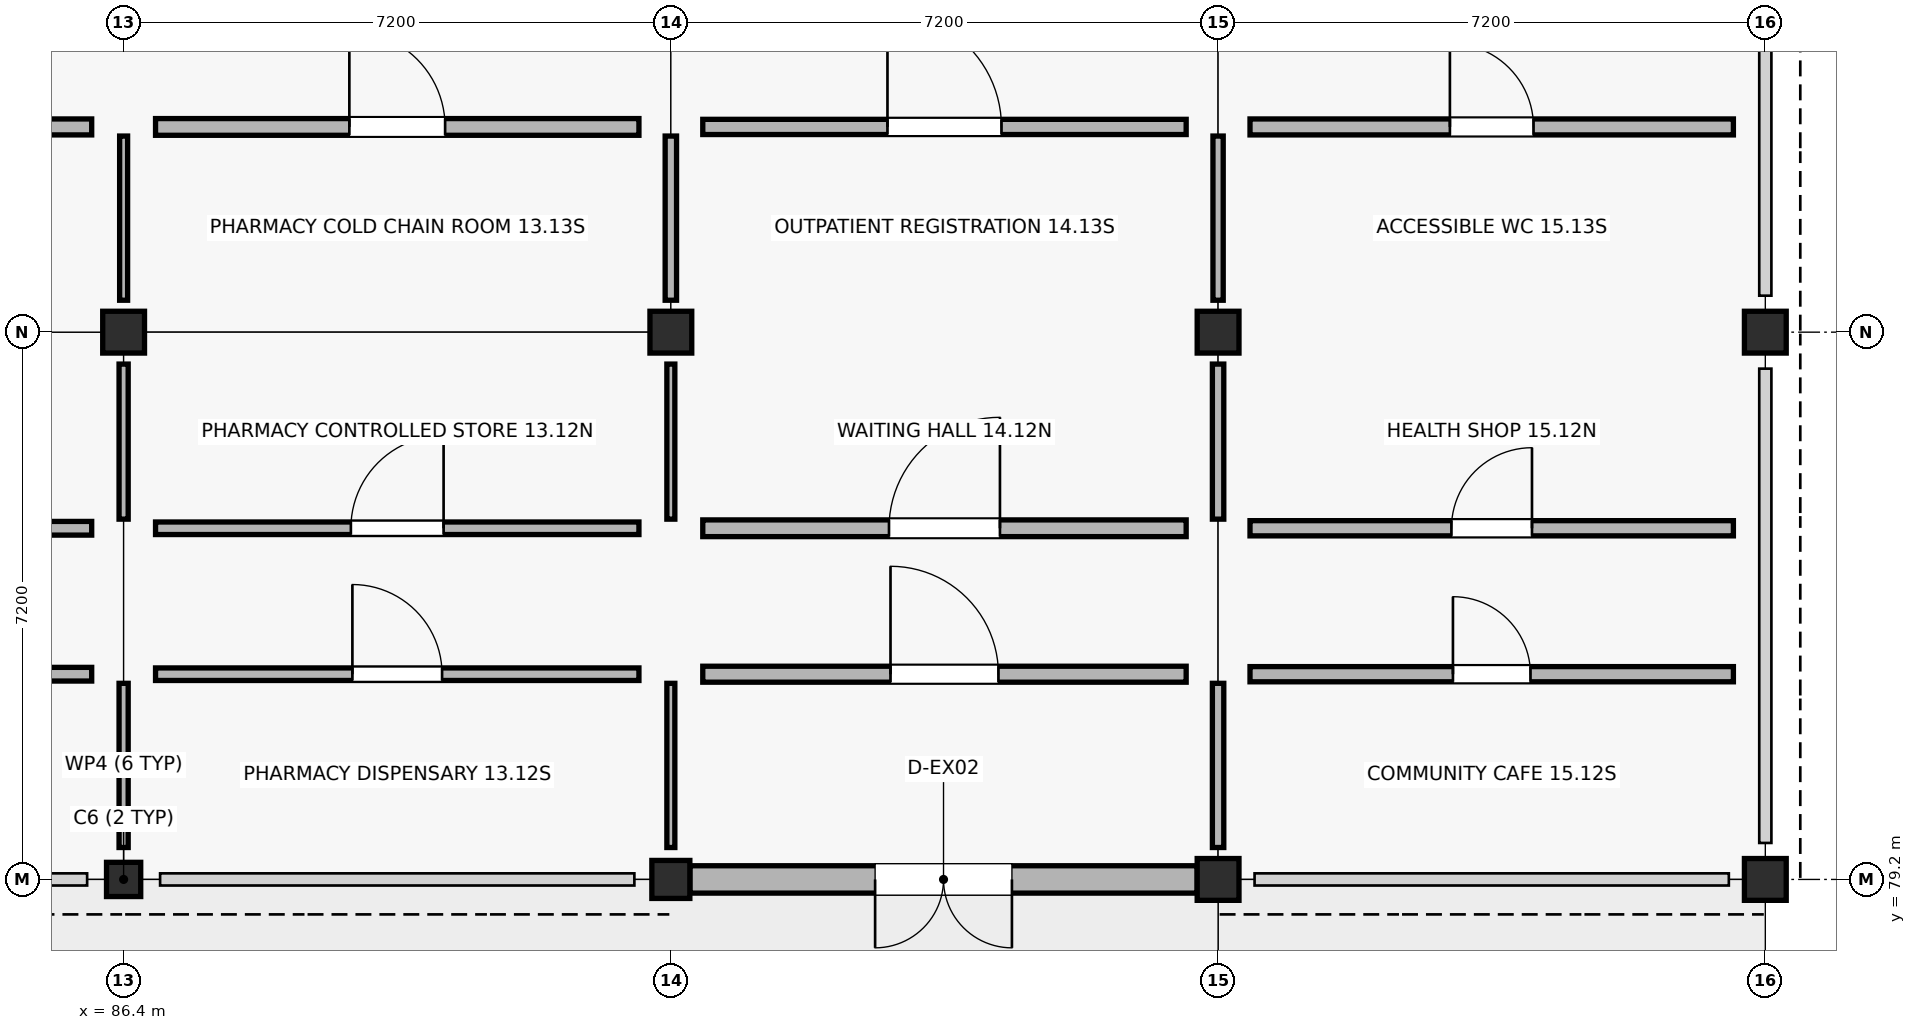
"""IFC4 building model, lengths in metres.
Left out: names, types, materials, properties, quantities, classifications, styles, units other than length and angle.
Written with IfcOpenShell. Run it as: python <this file> out.ifc"""

import sys

from ifc_helpers import new_model, si_unit, direction, frame, frame_2d, origin, origin_2d, place, context, subcontext, project, spatial, rectangle, extrude, element, fill, save


model = new_model("IFC4")
c1 = context("Model", 3, precision=1e-05, world=origin(), true_north=direction((0.0, 1.0)))
c2 = subcontext(c1, "Body", "Model", "MODEL_VIEW")
j1 = project(units=[si_unit("LENGTHUNIT", "METRE"), si_unit("PLANEANGLEUNIT", "RADIAN")], contexts=[c1])
p1 = place(None, origin())
s1 = spatial("IfcSite", under=j1, at=p1, CompositionType="ELEMENT")
p2 = place(p1, origin())
s2 = spatial("IfcBuilding", under=s1, at=p2, CompositionType="ELEMENT")
p3 = place(p2, origin())
s3 = spatial("IfcBuildingStorey", under=s2, at=p3, CompositionType="ELEMENT", Elevation=0.0)
p4 = place(p3, frame((86.4, 79.2, -0.25), z_axis=(0.0, 0.0, 1.0), x_axis=(1.0, 0.0, 0.0)))
e1 = element("IfcColumn", 1, at=p4, inside=s3, PredefinedType="COLUMN", context=c2, shape_type="SweptSolid", body=[
    extrude(rectangle(XDim=0.45, YDim=0.45, at=origin_2d()), origin(), (0.0, 0.0, 1.0), 4.53),
])
p5 = place(p3, frame((86.4, 86.4, -0.25), z_axis=(0.0, 0.0, 1.0), x_axis=(1.0, 0.0, 0.0)))
e2 = element("IfcColumn", 2, at=p5, inside=s3, PredefinedType="COLUMN", context=c2, shape_type="SweptSolid", body=[
    extrude(rectangle(XDim=0.55, YDim=0.55, at=origin_2d()), origin(), (0.0, 0.0, 1.0), 4.75),
])
p6 = place(p3, frame((93.6, 79.2, -0.25), z_axis=(0.0, 0.0, 1.0), x_axis=(1.0, 0.0, 0.0)))
e3 = element("IfcColumn", 3, at=p6, inside=s3, PredefinedType="COLUMN", context=c2, shape_type="SweptSolid", body=[
    extrude(rectangle(XDim=0.5, YDim=0.5, at=origin_2d()), origin(), (0.0, 0.0, 1.0), 4.53),
])
for number, where, z_axis, x_axis in (
    (4, (93.6, 86.4, -0.25), (0.0, 0.0, 1.0), (1.0, 0.0, 0.0)),
    (5, (100.8, 79.2, -0.25), (0.0, 0.0, 1.0), (1.0, 0.0, 0.0)),
    (6, (100.8, 86.4, -0.25), (0.0, 0.0, 1.0), (1.0, 0.0, 0.0)),
    (7, (108.0, 79.2, -0.25), (0.0, 0.0, 1.0), (1.0, 0.0, 0.0)),
    (8, (108.0, 86.4, -0.25), (0.0, 0.0, 1.0), (1.0, 0.0, 0.0)),
):
    element("IfcColumn", number, at=place(p3, frame(where, z_axis=z_axis, x_axis=x_axis)), inside=s3, PredefinedType="COLUMN", context=c2, shape_type="SweptSolid", body=[
        extrude(rectangle(XDim=0.55, YDim=0.55, at=origin_2d()), origin(), (0.0, 0.0, 1.0), 4.75),
    ])
p7 = place(p3, frame((100.525, 79.2, 0.0), z_axis=(0.0, 0.0, 1.0), x_axis=(-1.0, 0.0, 0.0)))
e9 = element("IfcWall", 9, at=p7, inside=s3, PredefinedType="SOLIDWALL", context=c2, shape_type="SweptSolid", body=[
    extrude(rectangle(XDim=6.675, YDim=0.36, at=frame_2d((3.337, 0.0))), origin(), (0.0, 0.0, 1.0), 3.47),
])
p8 = place(p7, frame((2.438, 0.0, 0.0)))
e10 = element("IfcOpeningElement", 10, at=p8, cuts=e9, PredefinedType="OPENING", context=c2, shape_type="SweptSolid", body=[
    extrude(rectangle(XDim=1.8, YDim=2.25, at=frame_2d((0.9, 1.125))), frame((0.0, 0.19, 0.0), z_axis=(0.0, -1.0, 0.0), x_axis=(1.0, 0.0, 0.0)), (0.0, 0.0, 1.0), 0.38),
])
p9 = place(p3, frame((79.62, 81.9, 0.0), z_axis=(0.0, 0.0, 1.0), x_axis=(1.0, 0.0, 0.0)))
e11 = element("IfcWall", 11, at=p9, inside=s3, PredefinedType="PARTITIONING", context=c2, shape_type="SweptSolid", body=[
    extrude(rectangle(XDim=6.36, YDim=0.18, at=frame_2d((3.18, 0.0))), origin(), (0.0, 0.0, 1.0), 3.36),
])
p10 = place(p9, frame((2.71, 0.0, 0.0)))
e12 = element("IfcOpeningElement", 12, at=p10, cuts=e11, PredefinedType="OPENING", context=c2, shape_type="SweptSolid", body=[
    extrude(rectangle(XDim=0.94, YDim=2.04, at=frame_2d((0.47, 1.02))), frame((0.0, 0.1, 0.0), z_axis=(0.0, -1.0, 0.0), x_axis=(1.0, 0.0, 0.0)), (0.0, 0.0, 1.0), 0.2),
])
p11 = place(p3, frame((86.4, 79.62, 0.0), z_axis=(0.0, 0.0, 1.0), x_axis=(0.0, 1.0, 0.0)))
e13 = element("IfcWall", 13, at=p11, inside=s3, PredefinedType="PARTITIONING", context=c2, shape_type="SweptSolid", body=[
    extrude(rectangle(XDim=2.16, YDim=0.12, at=frame_2d((1.08, 0.0))), origin(), (0.0, 0.0, 1.0), 3.36),
])
p12 = place(p3, frame((79.62, 83.82, 0.0), z_axis=(0.0, 0.0, 1.0), x_axis=(1.0, 0.0, 0.0)))
e14 = element("IfcWall", 14, at=p12, inside=s3, PredefinedType="PARTITIONING", context=c2, shape_type="SweptSolid", body=[
    extrude(rectangle(XDim=6.36, YDim=0.18, at=frame_2d((3.18, 0.0))), origin(), (0.0, 0.0, 1.0), 3.36),
])
p13 = place(p12, frame((2.69, 0.0, 0.0)))
e15 = element("IfcOpeningElement", 15, at=p13, cuts=e14, PredefinedType="OPENING", context=c2, shape_type="SweptSolid", body=[
    extrude(rectangle(XDim=0.98, YDim=2.04, at=frame_2d((0.49, 1.02))), frame((0.0, 0.1, 0.0), z_axis=(0.0, -1.0, 0.0), x_axis=(1.0, 0.0, 0.0)), (0.0, 0.0, 1.0), 0.2),
])
p14 = place(p3, frame((86.4, 83.94, 0.0), z_axis=(0.0, 0.0, 1.0), x_axis=(0.0, 1.0, 0.0)))
e16 = element("IfcWall", 16, at=p14, inside=s3, PredefinedType="PARTITIONING", context=c2, shape_type="SweptSolid", body=[
    extrude(rectangle(XDim=2.04, YDim=0.12, at=frame_2d((1.02, 0.0))), origin(), (0.0, 0.0, 1.0), 3.36),
])
p15 = place(p3, frame((79.62, 89.1, 0.0), z_axis=(0.0, 0.0, 1.0), x_axis=(1.0, 0.0, 0.0)))
e17 = element("IfcWall", 17, at=p15, inside=s3, PredefinedType="PLUMBINGWALL", context=c2, shape_type="SweptSolid", body=[
    extrude(rectangle(XDim=6.36, YDim=0.21, at=frame_2d((3.18, 0.0))), origin(), (0.0, 0.0, 1.0), 3.36),
])
p16 = place(p15, frame((2.67, 0.0, 0.0)))
e18 = element("IfcOpeningElement", 18, at=p16, cuts=e17, PredefinedType="OPENING", context=c2, shape_type="SweptSolid", body=[
    extrude(rectangle(XDim=1.02, YDim=2.04, at=frame_2d((0.51, 1.02))), frame((0.0, 0.115, 0.0), z_axis=(0.0, -1.0, 0.0), x_axis=(1.0, 0.0, 0.0)), (0.0, 0.0, 1.0), 0.23),
])
p17 = place(p3, frame((86.4, 86.82, 0.0), z_axis=(0.0, 0.0, 1.0), x_axis=(0.0, 1.0, 0.0)))
e19 = element("IfcWall", 19, at=p17, inside=s3, PredefinedType="PARTITIONING", context=c2, shape_type="SweptSolid", body=[
    extrude(rectangle(XDim=2.16, YDim=0.105, at=frame_2d((1.08, 0.0))), origin(), (0.0, 0.0, 1.0), 3.36),
])
p18 = place(p3, frame((86.82, 81.9, 0.0), z_axis=(0.0, 0.0, 1.0), x_axis=(1.0, 0.0, 0.0)))
e20 = element("IfcWall", 20, at=p18, inside=s3, PredefinedType="PARTITIONING", context=c2, shape_type="SweptSolid", body=[
    extrude(rectangle(XDim=6.36, YDim=0.165, at=frame_2d((3.18, 0.0))), origin(), (0.0, 0.0, 1.0), 3.36),
])
p19 = place(p18, frame((2.59, 0.0, 0.0)))
e21 = element("IfcOpeningElement", 21, at=p19, cuts=e20, PredefinedType="OPENING", context=c2, shape_type="SweptSolid", body=[
    extrude(rectangle(XDim=1.18, YDim=2.04, at=frame_2d((0.59, 1.02))), frame((0.0, 0.093, 0.0), z_axis=(0.0, -1.0, 0.0), x_axis=(1.0, 0.0, 0.0)), (0.0, 0.0, 1.0), 0.185),
])
p20 = place(p3, frame((93.6, 79.62, 0.0), z_axis=(0.0, 0.0, 1.0), x_axis=(0.0, 1.0, 0.0)))
e22 = element("IfcWall", 22, at=p20, inside=s3, PredefinedType="PARTITIONING", context=c2, shape_type="SweptSolid", body=[
    extrude(rectangle(XDim=2.16, YDim=0.105, at=frame_2d((1.08, 0.0))), origin(), (0.0, 0.0, 1.0), 3.36),
])
p21 = place(p3, frame((86.82, 83.82, 0.0), z_axis=(0.0, 0.0, 1.0), x_axis=(1.0, 0.0, 0.0)))
e23 = element("IfcWall", 23, at=p21, inside=s3, PredefinedType="PARTITIONING", context=c2, shape_type="SweptSolid", body=[
    extrude(rectangle(XDim=6.36, YDim=0.165, at=frame_2d((3.18, 0.0))), origin(), (0.0, 0.0, 1.0), 3.36),
])
p22 = place(p21, frame((2.57, 0.0, 0.0)))
e24 = element("IfcOpeningElement", 24, at=p22, cuts=e23, PredefinedType="OPENING", context=c2, shape_type="SweptSolid", body=[
    extrude(rectangle(XDim=1.22, YDim=2.04, at=frame_2d((0.61, 1.02))), frame((0.0, 0.093, 0.0), z_axis=(0.0, -1.0, 0.0), x_axis=(1.0, 0.0, 0.0)), (0.0, 0.0, 1.0), 0.185),
])
p23 = place(p3, frame((93.6, 83.94, 0.0), z_axis=(0.0, 0.0, 1.0), x_axis=(0.0, 1.0, 0.0)))
e25 = element("IfcWall", 25, at=p23, inside=s3, PredefinedType="PARTITIONING", context=c2, shape_type="SweptSolid", body=[
    extrude(rectangle(XDim=2.04, YDim=0.105, at=frame_2d((1.02, 0.0))), origin(), (0.0, 0.0, 1.0), 3.36),
])
p24 = place(p3, frame((86.82, 89.1, 0.0), z_axis=(0.0, 0.0, 1.0), x_axis=(1.0, 0.0, 0.0)))
e26 = element("IfcWall", 26, at=p24, inside=s3, PredefinedType="SOLIDWALL", context=c2, shape_type="SweptSolid", body=[
    extrude(rectangle(XDim=6.36, YDim=0.22, at=frame_2d((3.18, 0.0))), origin(), (0.0, 0.0, 1.0), 3.36),
])
p25 = place(p24, frame((2.55, 0.0, 0.0)))
e27 = element("IfcOpeningElement", 27, at=p25, cuts=e26, PredefinedType="OPENING", context=c2, shape_type="SweptSolid", body=[
    extrude(rectangle(XDim=1.26, YDim=2.04, at=frame_2d((0.63, 1.02))), frame((0.0, 0.12, 0.0), z_axis=(0.0, -1.0, 0.0), x_axis=(1.0, 0.0, 0.0)), (0.0, 0.0, 1.0), 0.24),
])
p26 = place(p3, frame((93.6, 86.82, 0.0), z_axis=(0.0, 0.0, 1.0), x_axis=(0.0, 1.0, 0.0)))
e28 = element("IfcWall", 28, at=p26, inside=s3, PredefinedType="PARTITIONING", context=c2, shape_type="SweptSolid", body=[
    extrude(rectangle(XDim=2.16, YDim=0.15, at=frame_2d((1.08, 0.0))), origin(), (0.0, 0.0, 1.0), 3.36),
])
p27 = place(p3, frame((94.02, 81.9, 0.0), z_axis=(0.0, 0.0, 1.0), x_axis=(1.0, 0.0, 0.0)))
e29 = element("IfcWall", 29, at=p27, inside=s3, PredefinedType="PLUMBINGWALL", context=c2, shape_type="SweptSolid", body=[
    extrude(rectangle(XDim=6.36, YDim=0.21, at=frame_2d((3.18, 0.0))), origin(), (0.0, 0.0, 1.0), 3.36),
])
p28 = place(p27, frame((2.47, 0.0, 0.0)))
e30 = element("IfcOpeningElement", 30, at=p28, cuts=e29, PredefinedType="OPENING", context=c2, shape_type="SweptSolid", body=[
    extrude(rectangle(XDim=1.42, YDim=2.04, at=frame_2d((0.71, 1.02))), frame((0.0, 0.115, 0.0), z_axis=(0.0, -1.0, 0.0), x_axis=(1.0, 0.0, 0.0)), (0.0, 0.0, 1.0), 0.23),
])
p29 = place(p3, frame((100.8, 79.62, 0.0), z_axis=(0.0, 0.0, 1.0), x_axis=(0.0, 1.0, 0.0)))
e31 = element("IfcWall", 31, at=p29, inside=s3, PredefinedType="PARTITIONING", context=c2, shape_type="SweptSolid", body=[
    extrude(rectangle(XDim=2.16, YDim=0.15, at=frame_2d((1.08, 0.0))), origin(), (0.0, 0.0, 1.0), 3.36),
])
p30 = place(p3, frame((94.02, 83.82, 0.0), z_axis=(0.0, 0.0, 1.0), x_axis=(1.0, 0.0, 0.0)))
e32 = element("IfcWall", 32, at=p30, inside=s3, PredefinedType="SOLIDWALL", context=c2, shape_type="SweptSolid", body=[
    extrude(rectangle(XDim=6.36, YDim=0.22, at=frame_2d((3.18, 0.0))), origin(), (0.0, 0.0, 1.0), 3.36),
])
p31 = place(p30, frame((2.45, 0.0, 0.0)))
e33 = element("IfcOpeningElement", 33, at=p31, cuts=e32, PredefinedType="OPENING", context=c2, shape_type="SweptSolid", body=[
    extrude(rectangle(XDim=1.46, YDim=2.04, at=frame_2d((0.73, 1.02))), frame((0.0, 0.12, 0.0), z_axis=(0.0, -1.0, 0.0), x_axis=(1.0, 0.0, 0.0)), (0.0, 0.0, 1.0), 0.24),
])
p32 = place(p3, frame((100.8, 83.94, 0.0), z_axis=(0.0, 0.0, 1.0), x_axis=(0.0, 1.0, 0.0)))
e34 = element("IfcWall", 34, at=p32, inside=s3, PredefinedType="PARTITIONING", context=c2, shape_type="SweptSolid", body=[
    extrude(rectangle(XDim=2.04, YDim=0.15, at=frame_2d((1.02, 0.0))), origin(), (0.0, 0.0, 1.0), 3.36),
])
p33 = place(p3, frame((94.02, 89.1, 0.0), z_axis=(0.0, 0.0, 1.0), x_axis=(1.0, 0.0, 0.0)))
e35 = element("IfcWall", 35, at=p33, inside=s3, PredefinedType="SOLIDWALL", context=c2, shape_type="SweptSolid", body=[
    extrude(rectangle(XDim=6.36, YDim=0.2, at=frame_2d((3.18, 0.0))), origin(), (0.0, 0.0, 1.0), 3.36),
])
p34 = place(p33, frame((2.43, 0.0, 0.0)))
e36 = element("IfcOpeningElement", 36, at=p34, cuts=e35, PredefinedType="OPENING", context=c2, shape_type="SweptSolid", body=[
    extrude(rectangle(XDim=1.5, YDim=2.04, at=frame_2d((0.75, 1.02))), frame((0.0, 0.11, 0.0), z_axis=(0.0, -1.0, 0.0), x_axis=(1.0, 0.0, 0.0)), (0.0, 0.0, 1.0), 0.22),
])
p35 = place(p3, frame((100.8, 86.82, 0.0), z_axis=(0.0, 0.0, 1.0), x_axis=(0.0, 1.0, 0.0)))
e37 = element("IfcWall", 37, at=p35, inside=s3, PredefinedType="PARTITIONING", context=c2, shape_type="SweptSolid", body=[
    extrude(rectangle(XDim=2.16, YDim=0.135, at=frame_2d((1.08, 0.0))), origin(), (0.0, 0.0, 1.0), 3.36),
])
p36 = place(p3, frame((101.22, 81.9, 0.0), z_axis=(0.0, 0.0, 1.0), x_axis=(1.0, 0.0, 0.0)))
e38 = element("IfcWall", 38, at=p36, inside=s3, PredefinedType="SOLIDWALL", context=c2, shape_type="SweptSolid", body=[
    extrude(rectangle(XDim=6.36, YDim=0.2, at=frame_2d((3.18, 0.0))), origin(), (0.0, 0.0, 1.0), 3.36),
])
p37 = place(p36, frame((2.67, 0.0, 0.0)))
e39 = element("IfcOpeningElement", 39, at=p37, cuts=e38, PredefinedType="OPENING", context=c2, shape_type="SweptSolid", body=[
    extrude(rectangle(XDim=1.02, YDim=2.09, at=frame_2d((0.51, 1.045))), frame((0.0, 0.11, 0.0), z_axis=(0.0, -1.0, 0.0), x_axis=(1.0, 0.0, 0.0)), (0.0, 0.0, 1.0), 0.22),
])
p38 = place(p3, frame((101.22, 83.82, 0.0), z_axis=(0.0, 0.0, 1.0), x_axis=(1.0, 0.0, 0.0)))
e40 = element("IfcWall", 40, at=p38, inside=s3, PredefinedType="SOLIDWALL", context=c2, shape_type="SweptSolid", body=[
    extrude(rectangle(XDim=6.36, YDim=0.2, at=frame_2d((3.18, 0.0))), origin(), (0.0, 0.0, 1.0), 3.36),
])
p39 = place(p38, frame((2.65, 0.0, 0.0)))
e41 = element("IfcOpeningElement", 41, at=p39, cuts=e40, PredefinedType="OPENING", context=c2, shape_type="SweptSolid", body=[
    extrude(rectangle(XDim=1.06, YDim=2.09, at=frame_2d((0.53, 1.045))), frame((0.0, 0.11, 0.0), z_axis=(0.0, -1.0, 0.0), x_axis=(1.0, 0.0, 0.0)), (0.0, 0.0, 1.0), 0.22),
])
p40 = place(p3, frame((101.22, 89.1, 0.0), z_axis=(0.0, 0.0, 1.0), x_axis=(1.0, 0.0, 0.0)))
e42 = element("IfcWall", 42, at=p40, inside=s3, PredefinedType="PLUMBINGWALL", context=c2, shape_type="SweptSolid", body=[
    extrude(rectangle(XDim=6.36, YDim=0.21, at=frame_2d((3.18, 0.0))), origin(), (0.0, 0.0, 1.0), 3.36),
])
p41 = place(p40, frame((2.63, 0.0, 0.0)))
e43 = element("IfcOpeningElement", 43, at=p41, cuts=e42, PredefinedType="OPENING", context=c2, shape_type="SweptSolid", body=[
    extrude(rectangle(XDim=1.1, YDim=2.09, at=frame_2d((0.55, 1.045))), frame((0.0, 0.115, 0.0), z_axis=(0.0, -1.0, 0.0), x_axis=(1.0, 0.0, 0.0)), (0.0, 0.0, 1.0), 0.23),
])
p42 = place(p8, origin())
e44 = element("IfcDoor", 44, at=p42, inside=s3, OperationType="DOUBLE_DOOR_SINGLE_SWING", PredefinedType="DOOR", context=c2, shape_type="SweptSolid", body=[
    extrude(rectangle(XDim=1.8, YDim=2.25, at=frame_2d((0.9, 1.125))), frame((0.0, 0.025, 0.0), z_axis=(0.0, -1.0, 0.0), x_axis=(1.0, 0.0, 0.0)), (0.0, 0.0, 1.0), 0.05),
])
fill(e10, e44)
p43 = place(p19, origin())
e45 = element("IfcDoor", 45, at=p43, inside=s3, OperationType="SINGLE_SWING_LEFT", PredefinedType="DOOR", context=c2, shape_type="SweptSolid", body=[
    extrude(rectangle(XDim=1.18, YDim=2.04, at=frame_2d((0.59, 1.02))), frame((0.0, 0.025, 0.0), z_axis=(0.0, -1.0, 0.0), x_axis=(1.0, 0.0, 0.0)), (0.0, 0.0, 1.0), 0.05),
])
fill(e21, e45)
p44 = place(p22, origin())
e46 = element("IfcDoor", 46, at=p44, inside=s3, OperationType="SINGLE_SWING_RIGHT", PredefinedType="DOOR", context=c2, shape_type="SweptSolid", body=[
    extrude(rectangle(XDim=1.22, YDim=2.04, at=frame_2d((0.61, 1.02))), frame((0.0, 0.025, 0.0), z_axis=(0.0, -1.0, 0.0), x_axis=(1.0, 0.0, 0.0)), (0.0, 0.0, 1.0), 0.05),
])
fill(e24, e46)
p45 = place(p25, origin())
e47 = element("IfcDoor", 47, at=p45, inside=s3, OperationType="SINGLE_SWING_LEFT", PredefinedType="DOOR", context=c2, shape_type="SweptSolid", body=[
    extrude(rectangle(XDim=1.26, YDim=2.04, at=frame_2d((0.63, 1.02))), frame((0.0, 0.025, 0.0), z_axis=(0.0, -1.0, 0.0), x_axis=(1.0, 0.0, 0.0)), (0.0, 0.0, 1.0), 0.05),
])
fill(e27, e47)
p46 = place(p28, origin())
e48 = element("IfcDoor", 48, at=p46, inside=s3, OperationType="SINGLE_SWING_LEFT", PredefinedType="DOOR", context=c2, shape_type="SweptSolid", body=[
    extrude(rectangle(XDim=1.42, YDim=2.04, at=frame_2d((0.71, 1.02))), frame((0.0, 0.025, 0.0), z_axis=(0.0, -1.0, 0.0), x_axis=(1.0, 0.0, 0.0)), (0.0, 0.0, 1.0), 0.05),
])
fill(e30, e48)
p47 = place(p31, origin())
e49 = element("IfcDoor", 49, at=p47, inside=s3, OperationType="SINGLE_SWING_RIGHT", PredefinedType="DOOR", context=c2, shape_type="SweptSolid", body=[
    extrude(rectangle(XDim=1.46, YDim=2.04, at=frame_2d((0.73, 1.02))), frame((0.0, 0.025, 0.0), z_axis=(0.0, -1.0, 0.0), x_axis=(1.0, 0.0, 0.0)), (0.0, 0.0, 1.0), 0.05),
])
fill(e33, e49)
p48 = place(p34, origin())
e50 = element("IfcDoor", 50, at=p48, inside=s3, OperationType="SINGLE_SWING_LEFT", PredefinedType="DOOR", context=c2, shape_type="SweptSolid", body=[
    extrude(rectangle(XDim=1.5, YDim=2.04, at=frame_2d((0.75, 1.02))), frame((0.0, 0.025, 0.0), z_axis=(0.0, -1.0, 0.0), x_axis=(1.0, 0.0, 0.0)), (0.0, 0.0, 1.0), 0.05),
])
fill(e36, e50)
p49 = place(p37, origin())
e51 = element("IfcDoor", 51, at=p49, inside=s3, OperationType="SINGLE_SWING_LEFT", PredefinedType="DOOR", context=c2, shape_type="SweptSolid", body=[
    extrude(rectangle(XDim=1.02, YDim=2.09, at=frame_2d((0.51, 1.045))), frame((0.0, 0.025, 0.0), z_axis=(0.0, -1.0, 0.0), x_axis=(1.0, 0.0, 0.0)), (0.0, 0.0, 1.0), 0.05),
])
fill(e39, e51)
p50 = place(p39, origin())
e52 = element("IfcDoor", 52, at=p50, inside=s3, OperationType="SINGLE_SWING_RIGHT", PredefinedType="DOOR", context=c2, shape_type="SweptSolid", body=[
    extrude(rectangle(XDim=1.06, YDim=2.09, at=frame_2d((0.53, 1.045))), frame((0.0, 0.025, 0.0), z_axis=(0.0, -1.0, 0.0), x_axis=(1.0, 0.0, 0.0)), (0.0, 0.0, 1.0), 0.05),
])
fill(e41, e52)
p51 = place(p41, origin())
e53 = element("IfcDoor", 53, at=p51, inside=s3, OperationType="SINGLE_SWING_LEFT", PredefinedType="DOOR", context=c2, shape_type="SweptSolid", body=[
    extrude(rectangle(XDim=1.1, YDim=2.09, at=frame_2d((0.55, 1.045))), frame((0.0, 0.025, 0.0), z_axis=(0.0, -1.0, 0.0), x_axis=(1.0, 0.0, 0.0)), (0.0, 0.0, 1.0), 0.05),
])
fill(e43, e53)
save(model, sys.argv[1])
